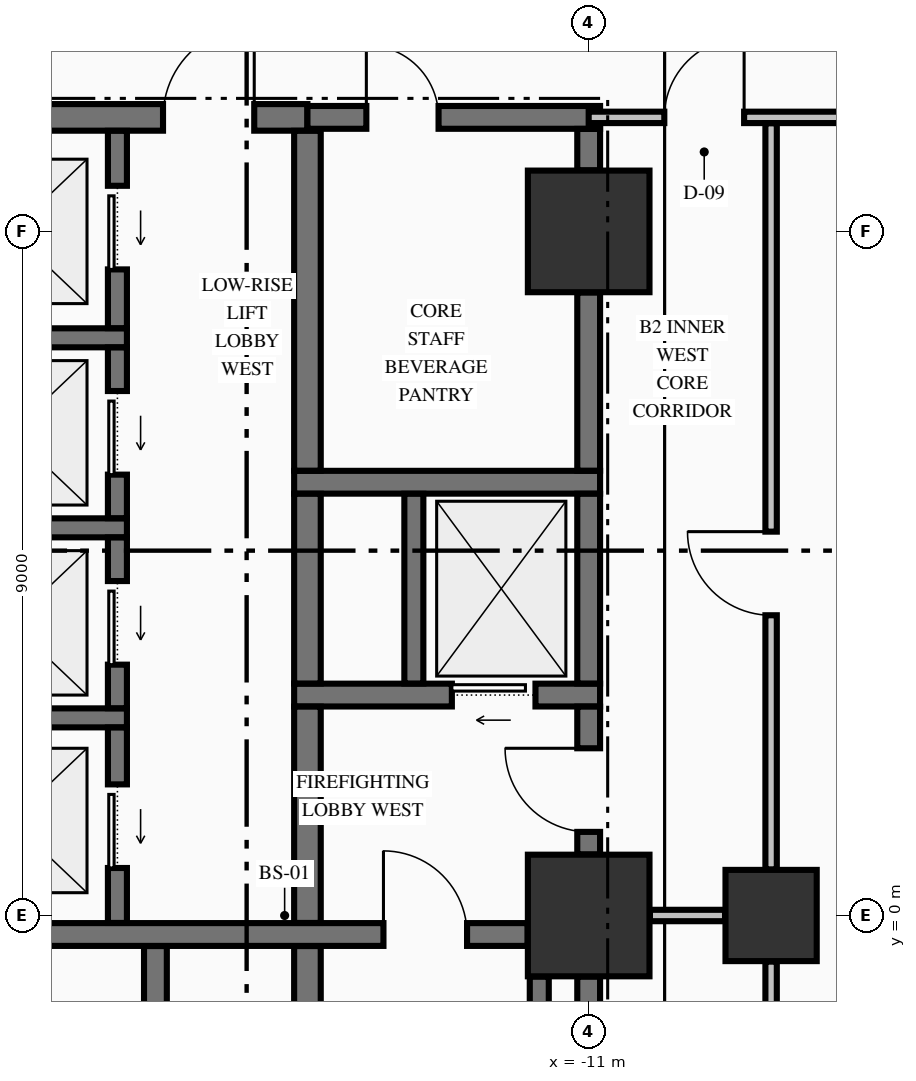
"""IFC4 building model, lengths in metres.
Left out: names, types, materials, properties, quantities, classifications, styles, units other than length and angle.
Written with IfcOpenShell. Run it as: python <this file> out.ifc"""

import sys

from ifc_helpers import new_model, si_unit, direction, frame, frame_2d, origin, origin_2d, place, context, subcontext, project, spatial, rectangle, extrude, element, fill, save


model = new_model("IFC4")
c1 = context("Model", 3, precision=1e-05, world=origin(), true_north=direction((0.0, 1.0)))
c2 = subcontext(c1, "Body", "Model", "MODEL_VIEW")
j1 = project(units=[si_unit("LENGTHUNIT", "METRE"), si_unit("PLANEANGLEUNIT", "RADIAN")], contexts=[c1])
p1 = place(None, origin())
s1 = spatial("IfcSite", under=j1, at=p1, CompositionType="ELEMENT")
p2 = place(p1, origin())
s2 = spatial("IfcBuilding", under=s1, at=p2, CompositionType="ELEMENT")
p3 = place(p2, frame((0.0, 0.0, -9.1)))
s3 = spatial("IfcBuildingStorey", under=s2, at=p3, CompositionType="ELEMENT", Elevation=-9.1)
for number, where, z_axis, x_axis in (
    (1, (-11.0, 0.0, -0.45), (0.0, 0.0, 1.0), (1.0, 0.0, 0.0)),
    (2, (-11.0, 9.0, -0.45), (0.0, 0.0, 1.0), (1.0, 0.0, 0.0)),
):
    element("IfcColumn", number, at=place(p3, frame(where, z_axis=z_axis, x_axis=x_axis)), inside=s3, PredefinedType="COLUMN", context=c2, shape_type="SweptSolid", body=[
        extrude(rectangle(XDim=1.6, YDim=1.6, at=origin_2d()), origin(), (0.0, 0.0, 1.0), 4.65),
    ])
p4 = place(p3, frame((-8.6, 0.0, -0.45), z_axis=(0.0, 0.0, 1.0), x_axis=(1.0, 0.0, 0.0)))
e3 = element("IfcColumn", 3, at=p4, inside=s3, PredefinedType="COLUMN", context=c2, shape_type="SweptSolid", body=[
    extrude(rectangle(XDim=1.2, YDim=1.2, at=origin_2d()), origin(), (0.0, 0.0, 1.0), 4.65),
])
p5 = place(p3, frame((-19.196, -0.25, 0.0), z_axis=(0.0, 0.0, 1.0), x_axis=(1.0, 0.0, 0.0)))
e4 = element("IfcWall", 4, at=p5, inside=s3, PredefinedType="SHEAR", context=c2, shape_type="SweptSolid", body=[
    extrude(rectangle(XDim=7.392, YDim=0.3, at=frame_2d((3.696, 0.0))), origin(), (0.0, 0.0, 1.0), 4.2),
])
p6 = place(p5, frame((5.496, 0.0, 0.0)))
e5 = element("IfcOpeningElement", 5, at=p6, cuts=e4, PredefinedType="OPENING", context=c2, shape_type="SweptSolid", body=[
    extrude(rectangle(XDim=1.1, YDim=2.15, at=frame_2d((0.55, 1.075))), frame((0.0, 0.16, 0.0), z_axis=(0.0, -1.0, 0.0), x_axis=(1.0, 0.0, 0.0)), (0.0, 0.0, 1.0), 0.32),
])
p7 = place(p3, frame((-20.175, 2.6, 0.0), z_axis=(0.0, 0.0, 1.0), x_axis=(1.0, 0.0, 0.0)))
e6 = element("IfcWall", 6, at=p7, inside=s3, PredefinedType="SOLIDWALL", context=c2, shape_type="SweptSolid", body=[
    extrude(rectangle(XDim=3.1, YDim=0.25, at=frame_2d((1.55, 0.0))), origin(), (0.0, 0.0, 1.0), 4.2),
])
p8 = place(p3, frame((-14.875, 2.9, 0.0), z_axis=(0.0, 0.0, 1.0), x_axis=(1.0, 0.0, 0.0)))
e7 = element("IfcWall", 7, at=p8, inside=s3, PredefinedType="SHEAR", context=c2, shape_type="SweptSolid", body=[
    extrude(rectangle(XDim=4.025, YDim=0.3, at=frame_2d((2.012, 0.0))), origin(), (0.0, 0.0, 1.0), 4.2),
])
p9 = place(p8, frame((2.075, 0.0, 0.0)))
e8 = element("IfcOpeningElement", 8, at=p9, cuts=e7, PredefinedType="OPENING", context=c2, shape_type="SweptSolid", body=[
    extrude(rectangle(XDim=1.1, YDim=2.2, at=frame_2d((0.55, 1.1))), frame((0.0, 0.16, 0.0), z_axis=(0.0, -1.0, 0.0), x_axis=(1.0, 0.0, 0.0)), (0.0, 0.0, 1.0), 0.32),
])
p10 = place(p3, frame((-20.175, 5.1, 0.0), z_axis=(0.0, 0.0, 1.0), x_axis=(1.0, 0.0, 0.0)))
e9 = element("IfcWall", 9, at=p10, inside=s3, PredefinedType="SOLIDWALL", context=c2, shape_type="SweptSolid", body=[
    extrude(rectangle(XDim=3.1, YDim=0.25, at=frame_2d((1.55, 0.0))), origin(), (0.0, 0.0, 1.0), 4.2),
])
p11 = place(p3, frame((-14.875, 5.7, 0.0), z_axis=(0.0, 0.0, 1.0), x_axis=(1.0, 0.0, 0.0)))
e10 = element("IfcWall", 10, at=p11, inside=s3, PredefinedType="SHEAR", context=c2, shape_type="SweptSolid", body=[
    extrude(rectangle(XDim=4.025, YDim=0.3, at=frame_2d((2.012, 0.0))), origin(), (0.0, 0.0, 1.0), 4.2),
])
p12 = place(p3, frame((-20.175, 7.6, 0.0), z_axis=(0.0, 0.0, 1.0), x_axis=(1.0, 0.0, 0.0)))
e11 = element("IfcWall", 11, at=p12, inside=s3, PredefinedType="SOLIDWALL", context=c2, shape_type="SweptSolid", body=[
    extrude(rectangle(XDim=3.1, YDim=0.25, at=frame_2d((1.55, 0.0))), origin(), (0.0, 0.0, 1.0), 4.2),
])
p13 = place(p3, frame((-20.175, 10.5, 0.0), z_axis=(0.0, 0.0, 1.0), x_axis=(1.0, 0.0, 0.0)))
e12 = element("IfcWall", 12, at=p13, inside=s3, PredefinedType="SHEAR", context=c2, shape_type="SweptSolid", body=[
    extrude(rectangle(XDim=5.475, YDim=0.35, at=frame_2d((2.738, 0.0))), origin(), (0.0, 0.0, 1.0), 4.2),
])
p14 = place(p13, frame((3.575, 0.0, 0.0)))
e13 = element("IfcOpeningElement", 13, at=p14, cuts=e12, PredefinedType="OPENING", context=c2, shape_type="SweptSolid", body=[
    extrude(rectangle(XDim=1.2, YDim=2.15, at=frame_2d((0.6, 1.075))), frame((0.0, 0.185, 0.0), z_axis=(0.0, -1.0, 0.0), x_axis=(1.0, 0.0, 0.0)), (0.0, 0.0, 1.0), 0.37),
])
p15 = place(p3, frame((-14.7, 10.5, 0.0), z_axis=(0.0, 0.0, 1.0), x_axis=(1.0, 0.0, 0.0)))
e14 = element("IfcWall", 14, at=p15, inside=s3, PredefinedType="SHEAR", context=c2, shape_type="SweptSolid", body=[
    extrude(rectangle(XDim=3.85, YDim=0.3, at=frame_2d((1.925, 0.0))), origin(), (0.0, 0.0, 1.0), 4.2),
])
p16 = place(p15, frame((0.775, 0.0, 0.0)))
e15 = element("IfcOpeningElement", 15, at=p16, cuts=e14, PredefinedType="OPENING", context=c2, shape_type="SweptSolid", body=[
    extrude(rectangle(XDim=0.95, YDim=2.15, at=frame_2d((0.475, 1.075))), frame((0.0, 0.16, 0.0), z_axis=(0.0, -1.0, 0.0), x_axis=(1.0, 0.0, 0.0)), (0.0, 0.0, 1.0), 0.32),
])
p17 = place(p3, frame((-10.194, 0.0, 0.0), z_axis=(0.0, 0.0, 1.0), x_axis=(1.0, 0.0, 0.0)))
e16 = element("IfcWall", 16, at=p17, inside=s3, PredefinedType="PARTITIONING", context=c2, shape_type="SweptSolid", body=[
    extrude(rectangle(XDim=0.988, YDim=0.15, at=frame_2d((0.494, 0.0))), origin(), (0.0, 0.0, 1.0), 3.242),
])
p18 = place(p3, frame((-11.0, 10.5, 0.0), z_axis=(0.0, 0.0, 1.0), x_axis=(1.0, 0.0, 0.0)))
e17 = element("IfcWall", 17, at=p18, inside=s3, PredefinedType="PARTITIONING", context=c2, shape_type="SweptSolid", body=[
    extrude(rectangle(XDim=22.0, YDim=0.15, at=frame_2d((11.0, 0.0))), origin(), (0.0, 0.0, 1.0), 4.2),
])
p19 = place(p18, frame((0.995, 0.0, 0.0)))
e18 = element("IfcOpeningElement", 18, at=p19, cuts=e17, PredefinedType="OPENING", context=c2, shape_type="SweptSolid", body=[
    extrude(rectangle(XDim=1.05, YDim=2.15, at=frame_2d((0.525, 1.075))), frame((0.0, 0.085, 0.0), z_axis=(0.0, -1.0, 0.0), x_axis=(1.0, 0.0, 0.0)), (0.0, 0.0, 1.0), 0.17),
])
p20 = place(p18, frame((19.955, 0.0, 0.0)))
e19 = element("IfcOpeningElement", 19, at=p20, cuts=e17, PredefinedType="OPENING", context=c2, shape_type="SweptSolid", body=[
    extrude(rectangle(XDim=1.05, YDim=2.15, at=frame_2d((0.525, 1.075))), frame((0.0, 0.085, 0.0), z_axis=(0.0, -1.0, 0.0), x_axis=(1.0, 0.0, 0.0)), (0.0, 0.0, 1.0), 0.17),
])
p21 = place(p3, frame((-17.2, -0.098, 0.0), z_axis=(0.0, 0.0, 1.0), x_axis=(0.0, 1.0, 0.0)))
e20 = element("IfcWall", 20, at=p21, inside=s3, PredefinedType="SOLIDWALL", context=c2, shape_type="SweptSolid", body=[
    extrude(rectangle(XDim=2.571, YDim=0.25, at=frame_2d((1.285, 0.0))), origin(), (0.0, 0.0, 1.0), 4.2),
])
p22 = place(p21, frame((0.723, 0.0, 0.0)))
e21 = element("IfcOpeningElement", 21, at=p22, cuts=e20, PredefinedType="OPENING", context=c2, shape_type="SweptSolid", body=[
    extrude(rectangle(XDim=1.1, YDim=2.2, at=frame_2d((0.55, 1.1))), frame((0.0, 0.135, 0.0), z_axis=(0.0, -1.0, 0.0), x_axis=(1.0, 0.0, 0.0)), (0.0, 0.0, 1.0), 0.27),
])
p23 = place(p3, frame((-17.2, 2.727, 0.0), z_axis=(0.0, 0.0, 1.0), x_axis=(0.0, 1.0, 0.0)))
e22 = element("IfcWall", 22, at=p23, inside=s3, PredefinedType="SOLIDWALL", context=c2, shape_type="SweptSolid", body=[
    extrude(rectangle(XDim=2.246, YDim=0.25, at=frame_2d((1.123, 0.0))), origin(), (0.0, 0.0, 1.0), 4.2),
])
p24 = place(p23, frame((0.573, 0.0, 0.0)))
e23 = element("IfcOpeningElement", 23, at=p24, cuts=e22, PredefinedType="OPENING", context=c2, shape_type="SweptSolid", body=[
    extrude(rectangle(XDim=1.1, YDim=2.2, at=frame_2d((0.55, 1.1))), frame((0.0, 0.135, 0.0), z_axis=(0.0, -1.0, 0.0), x_axis=(1.0, 0.0, 0.0)), (0.0, 0.0, 1.0), 0.27),
])
p25 = place(p3, frame((-17.2, 5.227, 0.0), z_axis=(0.0, 0.0, 1.0), x_axis=(0.0, 1.0, 0.0)))
e24 = element("IfcWall", 24, at=p25, inside=s3, PredefinedType="SOLIDWALL", context=c2, shape_type="SweptSolid", body=[
    extrude(rectangle(XDim=2.246, YDim=0.25, at=frame_2d((1.123, 0.0))), origin(), (0.0, 0.0, 1.0), 4.2),
])
p26 = place(p25, frame((0.573, 0.0, 0.0)))
e25 = element("IfcOpeningElement", 25, at=p26, cuts=e24, PredefinedType="OPENING", context=c2, shape_type="SweptSolid", body=[
    extrude(rectangle(XDim=1.1, YDim=2.2, at=frame_2d((0.55, 1.1))), frame((0.0, 0.135, 0.0), z_axis=(0.0, -1.0, 0.0), x_axis=(1.0, 0.0, 0.0)), (0.0, 0.0, 1.0), 0.27),
])
p27 = place(p3, frame((-17.2, 7.727, 0.0), z_axis=(0.0, 0.0, 1.0), x_axis=(0.0, 1.0, 0.0)))
e26 = element("IfcWall", 26, at=p27, inside=s3, PredefinedType="SOLIDWALL", context=c2, shape_type="SweptSolid", body=[
    extrude(rectangle(XDim=2.596, YDim=0.25, at=frame_2d((1.298, 0.0))), origin(), (0.0, 0.0, 1.0), 4.2),
])
p28 = place(p27, frame((0.773, 0.0, 0.0)))
e27 = element("IfcOpeningElement", 27, at=p28, cuts=e26, PredefinedType="OPENING", context=c2, shape_type="SweptSolid", body=[
    extrude(rectangle(XDim=1.1, YDim=2.2, at=frame_2d((0.55, 1.1))), frame((0.0, 0.135, 0.0), z_axis=(0.0, -1.0, 0.0), x_axis=(1.0, 0.0, 0.0)), (0.0, 0.0, 1.0), 0.27),
])
p29 = place(p3, frame((-16.7, -9.773, 0.0), z_axis=(0.0, 0.0, 1.0), x_axis=(0.0, 1.0, 0.0)))
e28 = element("IfcWall", 28, at=p29, inside=s3, PredefinedType="SHEAR", context=c2, shape_type="SweptSolid", body=[
    extrude(rectangle(XDim=9.371, YDim=0.3, at=frame_2d((4.686, 0.0))), origin(), (0.0, 0.0, 1.0), 4.2),
])
p30 = place(p3, frame((-14.7, -9.773, 0.0), z_axis=(0.0, 0.0, 1.0), x_axis=(0.0, 1.0, 0.0)))
e29 = element("IfcWall", 29, at=p30, inside=s3, PredefinedType="SHEAR", context=c2, shape_type="SweptSolid", body=[
    extrude(rectangle(XDim=9.371, YDim=0.35, at=frame_2d((4.686, 0.0))), origin(), (0.0, 0.0, 1.0), 4.2),
])
p31 = place(p3, frame((-14.7, -0.098, 0.0), z_axis=(0.0, 0.0, 1.0), x_axis=(0.0, 1.0, 0.0)))
e30 = element("IfcWall", 30, at=p31, inside=s3, PredefinedType="SHEAR", context=c2, shape_type="SweptSolid", body=[
    extrude(rectangle(XDim=2.846, YDim=0.35, at=frame_2d((1.423, 0.0))), origin(), (0.0, 0.0, 1.0), 4.2),
])
p32 = place(p3, frame((-14.7, 3.052, 0.0), z_axis=(0.0, 0.0, 1.0), x_axis=(0.0, 1.0, 0.0)))
e31 = element("IfcWall", 31, at=p32, inside=s3, PredefinedType="SHEAR", context=c2, shape_type="SweptSolid", body=[
    extrude(rectangle(XDim=2.496, YDim=0.35, at=frame_2d((1.248, 0.0))), origin(), (0.0, 0.0, 1.0), 4.2),
])
p33 = place(p3, frame((-14.7, 5.852, 0.0), z_axis=(0.0, 0.0, 1.0), x_axis=(0.0, 1.0, 0.0)))
e32 = element("IfcWall", 32, at=p33, inside=s3, PredefinedType="SHEAR", context=c2, shape_type="SweptSolid", body=[
    extrude(rectangle(XDim=4.471, YDim=0.35, at=frame_2d((2.235, 0.0))), origin(), (0.0, 0.0, 1.0), 4.2),
])
p34 = place(p3, frame((-13.3, 3.052, 0.0), z_axis=(0.0, 0.0, 1.0), x_axis=(0.0, 1.0, 0.0)))
e33 = element("IfcWall", 33, at=p34, inside=s3, PredefinedType="SOLIDWALL", context=c2, shape_type="SweptSolid", body=[
    extrude(rectangle(XDim=2.496, YDim=0.25, at=frame_2d((1.248, 0.0))), origin(), (0.0, 0.0, 1.0), 4.2),
])
p35 = place(p3, frame((-11.65, -8.196, 0.0), z_axis=(0.0, 0.0, 1.0), x_axis=(0.0, 1.0, 0.0)))
e34 = element("IfcWall", 34, at=p35, inside=s3, PredefinedType="SOLIDWALL", context=c2, shape_type="SweptSolid", body=[
    extrude(rectangle(XDim=7.392, YDim=0.25, at=frame_2d((3.696, 0.0))), origin(), (0.0, 0.0, 1.0), 4.2),
])
p36 = place(p3, frame((-11.0, -8.196, 0.0), z_axis=(0.0, 0.0, 1.0), x_axis=(0.0, 1.0, 0.0)))
e35 = element("IfcWall", 35, at=p36, inside=s3, PredefinedType="SHEAR", context=c2, shape_type="SweptSolid", body=[
    extrude(rectangle(XDim=7.392, YDim=0.3, at=frame_2d((3.696, 0.0))), origin(), (0.0, 0.0, 1.0), 4.2),
])
p37 = place(p3, frame((-11.0, 0.804, 0.0), z_axis=(0.0, 0.0, 1.0), x_axis=(0.0, 1.0, 0.0)))
e36 = element("IfcWall", 36, at=p37, inside=s3, PredefinedType="SHEAR", context=c2, shape_type="SweptSolid", body=[
    extrude(rectangle(XDim=1.944, YDim=0.3, at=frame_2d((0.972, 0.0))), origin(), (0.0, 0.0, 1.0), 4.2),
])
p38 = place(p37, frame((0.296, 0.0, 0.0)))
e37 = element("IfcOpeningElement", 37, at=p38, cuts=e36, PredefinedType="OPENING", context=c2, shape_type="SweptSolid", body=[
    extrude(rectangle(XDim=1.1, YDim=2.15, at=frame_2d((0.55, 1.075))), frame((0.0, 0.16, 0.0), z_axis=(0.0, -1.0, 0.0), x_axis=(1.0, 0.0, 0.0)), (0.0, 0.0, 1.0), 0.32),
])
p39 = place(p3, frame((-11.0, 3.052, 0.0), z_axis=(0.0, 0.0, 1.0), x_axis=(0.0, 1.0, 0.0)))
e38 = element("IfcWall", 38, at=p39, inside=s3, PredefinedType="SHEAR", context=c2, shape_type="SweptSolid", body=[
    extrude(rectangle(XDim=2.496, YDim=0.3, at=frame_2d((1.248, 0.0))), origin(), (0.0, 0.0, 1.0), 4.2),
])
p40 = place(p3, frame((-11.0, 5.852, 0.0), z_axis=(0.0, 0.0, 1.0), x_axis=(0.0, 1.0, 0.0)))
e39 = element("IfcWall", 39, at=p40, inside=s3, PredefinedType="SHEAR", context=c2, shape_type="SweptSolid", body=[
    extrude(rectangle(XDim=2.344, YDim=0.3, at=frame_2d((1.172, 0.0))), origin(), (0.0, 0.0, 1.0), 4.2),
])
p41 = place(p3, frame((-11.0, 9.804, 0.0), z_axis=(0.0, 0.0, 1.0), x_axis=(0.0, 1.0, 0.0)))
e40 = element("IfcWall", 40, at=p41, inside=s3, PredefinedType="SHEAR", context=c2, shape_type="SweptSolid", body=[
    extrude(rectangle(XDim=0.544, YDim=0.3, at=frame_2d((0.272, 0.0))), origin(), (0.0, 0.0, 1.0), 4.2),
])
p42 = place(p3, frame((-8.6, -9.872, 0.0), z_axis=(0.0, 0.0, 1.0), x_axis=(0.0, 1.0, 0.0)))
e41 = element("IfcWall", 41, at=p42, inside=s3, PredefinedType="PARTITIONING", context=c2, shape_type="SweptSolid", body=[
    extrude(rectangle(XDim=9.266, YDim=0.15, at=frame_2d((4.633, 0.0))), origin(), (0.0, 0.0, 1.0), 4.2),
])
p43 = place(p3, frame((-8.6, 0.606, 0.0), z_axis=(0.0, 0.0, 1.0), x_axis=(0.0, 1.0, 0.0)))
e42 = element("IfcWall", 42, at=p43, inside=s3, PredefinedType="PARTITIONING", context=c2, shape_type="SweptSolid", body=[
    extrude(rectangle(XDim=9.816, YDim=0.15, at=frame_2d((4.908, 0.0))), origin(), (0.0, 0.0, 1.0), 3.242),
])
p44 = place(p43, frame((3.344, 0.0, 0.0)))
e43 = element("IfcOpeningElement", 43, at=p44, cuts=e42, PredefinedType="OPENING", context=c2, shape_type="SweptSolid", body=[
    extrude(rectangle(XDim=1.1, YDim=2.15, at=frame_2d((0.55, 1.075))), frame((0.0, 0.085, 0.0), z_axis=(0.0, -1.0, 0.0), x_axis=(1.0, 0.0, 0.0)), (0.0, 0.0, 1.0), 0.17),
])
p45 = place(p6, origin())
e44 = element("IfcDoor", 44, at=p45, inside=s3, OperationType="SINGLE_SWING_LEFT", PredefinedType="DOOR", context=c2, shape_type="SweptSolid", body=[
    extrude(rectangle(XDim=1.1, YDim=2.15, at=frame_2d((0.55, 1.075))), frame((0.0, 0.025, 0.0), z_axis=(0.0, -1.0, 0.0), x_axis=(1.0, 0.0, 0.0)), (0.0, 0.0, 1.0), 0.05),
])
fill(e5, e44)
p46 = place(p38, origin())
e45 = element("IfcDoor", 45, at=p46, inside=s3, OperationType="SINGLE_SWING_RIGHT", PredefinedType="DOOR", context=c2, shape_type="SweptSolid", body=[
    extrude(rectangle(XDim=1.1, YDim=2.15, at=frame_2d((0.55, 1.075))), frame((0.0, 0.025, 0.0), z_axis=(0.0, -1.0, 0.0), x_axis=(1.0, 0.0, 0.0)), (0.0, 0.0, 1.0), 0.05),
])
fill(e37, e45)
p47 = place(p9, origin())
e46 = element("IfcDoor", 46, at=p47, inside=s3, OperationType="SLIDING_TO_LEFT", PredefinedType="DOOR", context=c2, shape_type="SweptSolid", body=[
    extrude(rectangle(XDim=1.1, YDim=2.2, at=frame_2d((0.55, 1.1))), frame((0.0, 0.025, 0.0), z_axis=(0.0, -1.0, 0.0), x_axis=(1.0, 0.0, 0.0)), (0.0, 0.0, 1.0), 0.05),
])
fill(e8, e46)
p48 = place(p16, origin())
e47 = element("IfcDoor", 47, at=p48, inside=s3, OperationType="SINGLE_SWING_LEFT", PredefinedType="DOOR", context=c2, shape_type="SweptSolid", body=[
    extrude(rectangle(XDim=0.95, YDim=2.15, at=frame_2d((0.475, 1.075))), frame((0.0, 0.025, 0.0), z_axis=(0.0, -1.0, 0.0), x_axis=(1.0, 0.0, 0.0)), (0.0, 0.0, 1.0), 0.05),
])
fill(e15, e47)
p49 = place(p14, origin())
e48 = element("IfcDoor", 48, at=p49, inside=s3, OperationType="SINGLE_SWING_RIGHT", PredefinedType="DOOR", context=c2, shape_type="SweptSolid", body=[
    extrude(rectangle(XDim=1.2, YDim=2.15, at=frame_2d((0.6, 1.075))), frame((0.0, 0.025, 0.0), z_axis=(0.0, -1.0, 0.0), x_axis=(1.0, 0.0, 0.0)), (0.0, 0.0, 1.0), 0.05),
])
fill(e13, e48)
p50 = place(p22, origin())
e49 = element("IfcDoor", 49, at=p50, inside=s3, OperationType="SLIDING_TO_LEFT", PredefinedType="DOOR", context=c2, shape_type="SweptSolid", body=[
    extrude(rectangle(XDim=1.1, YDim=2.2, at=frame_2d((0.55, 1.1))), frame((0.0, 0.025, 0.0), z_axis=(0.0, -1.0, 0.0), x_axis=(1.0, 0.0, 0.0)), (0.0, 0.0, 1.0), 0.05),
])
fill(e21, e49)
p51 = place(p24, origin())
e50 = element("IfcDoor", 50, at=p51, inside=s3, OperationType="SLIDING_TO_LEFT", PredefinedType="DOOR", context=c2, shape_type="SweptSolid", body=[
    extrude(rectangle(XDim=1.1, YDim=2.2, at=frame_2d((0.55, 1.1))), frame((0.0, 0.025, 0.0), z_axis=(0.0, -1.0, 0.0), x_axis=(1.0, 0.0, 0.0)), (0.0, 0.0, 1.0), 0.05),
])
fill(e23, e50)
p52 = place(p26, origin())
e51 = element("IfcDoor", 51, at=p52, inside=s3, OperationType="SLIDING_TO_LEFT", PredefinedType="DOOR", context=c2, shape_type="SweptSolid", body=[
    extrude(rectangle(XDim=1.1, YDim=2.2, at=frame_2d((0.55, 1.1))), frame((0.0, 0.025, 0.0), z_axis=(0.0, -1.0, 0.0), x_axis=(1.0, 0.0, 0.0)), (0.0, 0.0, 1.0), 0.05),
])
fill(e25, e51)
p53 = place(p28, origin())
e52 = element("IfcDoor", 52, at=p53, inside=s3, OperationType="SLIDING_TO_LEFT", PredefinedType="DOOR", context=c2, shape_type="SweptSolid", body=[
    extrude(rectangle(XDim=1.1, YDim=2.2, at=frame_2d((0.55, 1.1))), frame((0.0, 0.025, 0.0), z_axis=(0.0, -1.0, 0.0), x_axis=(1.0, 0.0, 0.0)), (0.0, 0.0, 1.0), 0.05),
])
fill(e27, e52)
p54 = place(p19, origin())
e53 = element("IfcDoor", 53, at=p54, inside=s3, OperationType="SINGLE_SWING_RIGHT", PredefinedType="DOOR", context=c2, shape_type="SweptSolid", body=[
    extrude(rectangle(XDim=1.05, YDim=2.15, at=frame_2d((0.525, 1.075))), frame((0.0, 0.025, 0.0), z_axis=(0.0, -1.0, 0.0), x_axis=(1.0, 0.0, 0.0)), (0.0, 0.0, 1.0), 0.05),
])
fill(e18, e53)
p55 = place(p44, origin())
e54 = element("IfcDoor", 54, at=p55, inside=s3, OperationType="SINGLE_SWING_RIGHT", PredefinedType="DOOR", context=c2, shape_type="SweptSolid", body=[
    extrude(rectangle(XDim=1.1, YDim=2.15, at=frame_2d((0.55, 1.075))), frame((0.0, 0.025, 0.0), z_axis=(0.0, -1.0, 0.0), x_axis=(1.0, 0.0, 0.0)), (0.0, 0.0, 1.0), 0.05),
])
fill(e43, e54)
save(model, sys.argv[1])
